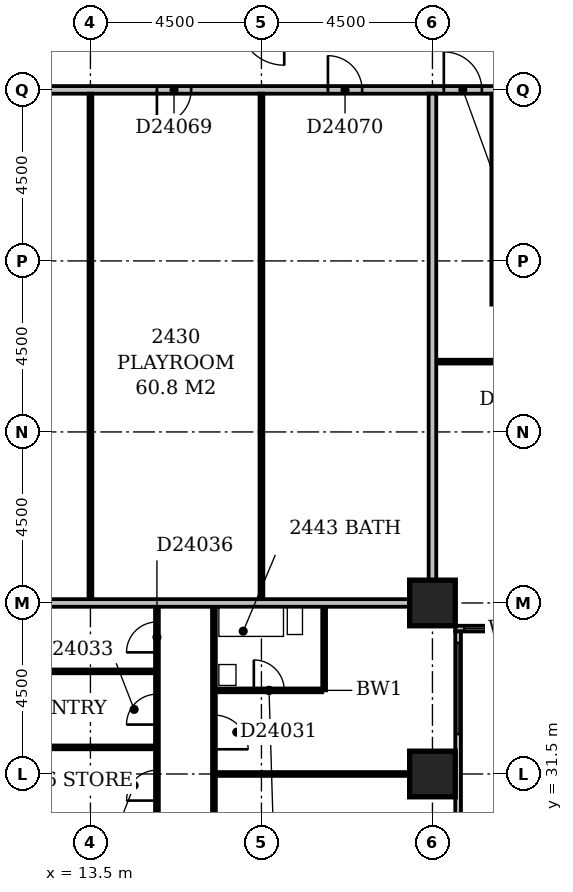
"""IFC4 building model, lengths in metres.
Left out: names, types, materials, properties, quantities, classifications, styles, units other than length and angle.
Written with IfcOpenShell. Run it as: python <this file> out.ifc"""

import sys

from ifc_helpers import new_model, si_unit, direction, frame, frame_2d, origin, origin_2d, place, context, subcontext, project, spatial, rectangle, extrude, element, fill, save


model = new_model("IFC4")
c1 = context("Model", 3, precision=1e-05, world=origin(), true_north=direction((0.0, 1.0)))
c2 = subcontext(c1, "Body", "Model", "MODEL_VIEW")
j1 = project(units=[si_unit("LENGTHUNIT", "METRE"), si_unit("PLANEANGLEUNIT", "RADIAN")], contexts=[c1])
p1 = place(None, origin())
s1 = spatial("IfcSite", under=j1, at=p1, CompositionType="ELEMENT")
p2 = place(p1, origin())
s2 = spatial("IfcBuilding", under=s1, at=p2, CompositionType="ELEMENT")
p3 = place(p2, frame((0.0, 0.0, 97.4)))
s3 = spatial("IfcBuildingStorey", under=s2, at=p3, CompositionType="ELEMENT", Elevation=97.4)
for number, where, z_axis, x_axis in (
    (1, (22.5, 31.5, -0.3), (0.0, 0.0, 1.0), (1.0, 0.0, 0.0)),
    (2, (22.5, 36.0, -0.3), (0.0, 0.0, 1.0), (1.0, 0.0, 0.0)),
):
    element("IfcColumn", number, at=place(p3, frame(where, z_axis=z_axis, x_axis=x_axis)), inside=s3, PredefinedType="COLUMN", context=c2, shape_type="SweptSolid", body=[
        extrude(rectangle(XDim=1.2, YDim=1.2, at=origin_2d()), origin(), (0.0, 0.0, 1.0), 3.6),
    ])
p4 = place(p3, frame((23.175, 17.4, 0.0), z_axis=(0.0, 0.0, 1.0), x_axis=(0.0, 1.0, 0.0)))
e3 = element("IfcWall", 3, at=p4, inside=s3, PredefinedType="STANDARD", context=c2, shape_type="SweptSolid", body=[
    extrude(rectangle(XDim=17.85, YDim=0.15, at=frame_2d((8.925, 0.0))), origin(), (0.0, 0.0, 1.0), 2.7),
])
p5 = place(p4, frame((1.487, 0.0, 0.6)))
e4 = element("IfcOpeningElement", 4, at=p5, cuts=e3, PredefinedType="OPENING", context=c2, shape_type="SweptSolid", body=[
    extrude(rectangle(XDim=1.8, YDim=1.8, at=frame_2d((0.9, 0.9))), frame((0.0, 0.087, 0.0), z_axis=(0.0, -1.0, 0.0), x_axis=(1.0, 0.0, 0.0)), (0.0, 0.0, 1.0), 0.174),
])
p6 = place(p4, frame((6.15, 0.0, 0.6)))
e5 = element("IfcOpeningElement", 5, at=p6, cuts=e3, PredefinedType="OPENING", context=c2, shape_type="SweptSolid", body=[
    extrude(rectangle(XDim=2.4, YDim=1.8, at=frame_2d((1.2, 0.9))), frame((0.0, 0.087, 0.0), z_axis=(0.0, -1.0, 0.0), x_axis=(1.0, 0.0, 0.0)), (0.0, 0.0, 1.0), 0.174),
])
p7 = place(p4, frame((10.65, 0.0, 0.6)))
e6 = element("IfcOpeningElement", 6, at=p7, cuts=e3, PredefinedType="OPENING", context=c2, shape_type="SweptSolid", body=[
    extrude(rectangle(XDim=2.4, YDim=1.8, at=frame_2d((1.2, 0.9))), frame((0.0, 0.087, 0.0), z_axis=(0.0, -1.0, 0.0), x_axis=(1.0, 0.0, 0.0)), (0.0, 0.0, 1.0), 0.174),
])
p8 = place(p4, frame((15.15, 0.0, 0.6)))
e7 = element("IfcOpeningElement", 7, at=p8, cuts=e3, PredefinedType="OPENING", context=c2, shape_type="SweptSolid", body=[
    extrude(rectangle(XDim=2.4, YDim=1.8, at=frame_2d((1.2, 0.9))), frame((0.0, 0.087, 0.0), z_axis=(0.0, -1.0, 0.0), x_axis=(1.0, 0.0, 0.0)), (0.0, 0.0, 1.0), 0.174),
])
p9 = place(p3, frame((23.1, 35.325, 0.0), z_axis=(0.0, 0.0, 1.0), x_axis=(1.0, 0.0, 0.0)))
e8 = element("IfcWall", 8, at=p9, inside=s3, PredefinedType="STANDARD", context=c2, shape_type="SweptSolid", body=[
    extrude(rectangle(XDim=45.15, YDim=0.15, at=frame_2d((22.575, 0.0))), origin(), (0.0, 0.0, 1.0), 2.7),
])
p10 = place(p9, frame((0.238, 0.0, 0.6)))
e9 = element("IfcOpeningElement", 9, at=p10, cuts=e8, PredefinedType="OPENING", context=c2, shape_type="SweptSolid", body=[
    extrude(rectangle(XDim=2.1, YDim=1.8, at=frame_2d((1.05, 0.9))), frame((0.0, 0.087, 0.0), z_axis=(0.0, -1.0, 0.0), x_axis=(1.0, 0.0, 0.0)), (0.0, 0.0, 1.0), 0.174),
])
p11 = place(p9, frame((4.95, 0.0, 0.6)))
e10 = element("IfcOpeningElement", 10, at=p11, cuts=e8, PredefinedType="OPENING", context=c2, shape_type="SweptSolid", body=[
    extrude(rectangle(XDim=2.4, YDim=1.8, at=frame_2d((1.2, 0.9))), frame((0.0, 0.087, 0.0), z_axis=(0.0, -1.0, 0.0), x_axis=(1.0, 0.0, 0.0)), (0.0, 0.0, 1.0), 0.174),
])
p12 = place(p9, frame((9.45, 0.0, 0.6)))
e11 = element("IfcOpeningElement", 11, at=p12, cuts=e8, PredefinedType="OPENING", context=c2, shape_type="SweptSolid", body=[
    extrude(rectangle(XDim=2.4, YDim=1.8, at=frame_2d((1.2, 0.9))), frame((0.0, 0.087, 0.0), z_axis=(0.0, -1.0, 0.0), x_axis=(1.0, 0.0, 0.0)), (0.0, 0.0, 1.0), 0.174),
])
p13 = place(p9, frame((13.95, 0.0, 0.6)))
e12 = element("IfcOpeningElement", 12, at=p13, cuts=e8, PredefinedType="OPENING", context=c2, shape_type="SweptSolid", body=[
    extrude(rectangle(XDim=2.4, YDim=1.8, at=frame_2d((1.2, 0.9))), frame((0.0, 0.087, 0.0), z_axis=(0.0, -1.0, 0.0), x_axis=(1.0, 0.0, 0.0)), (0.0, 0.0, 1.0), 0.174),
])
p14 = place(p9, frame((18.45, 0.0, 0.6)))
e13 = element("IfcOpeningElement", 13, at=p14, cuts=e8, PredefinedType="OPENING", context=c2, shape_type="SweptSolid", body=[
    extrude(rectangle(XDim=2.4, YDim=1.8, at=frame_2d((1.2, 0.9))), frame((0.0, 0.087, 0.0), z_axis=(0.0, -1.0, 0.0), x_axis=(1.0, 0.0, 0.0)), (0.0, 0.0, 1.0), 0.174),
])
p15 = place(p9, frame((24.326, 0.0, 0.6)))
e14 = element("IfcOpeningElement", 14, at=p15, cuts=e8, PredefinedType="OPENING", context=c2, shape_type="SweptSolid", body=[
    extrude(rectangle(XDim=1.2, YDim=1.8, at=frame_2d((0.6, 0.9))), frame((0.0, 0.087, 0.0), z_axis=(0.0, -1.0, 0.0), x_axis=(1.0, 0.0, 0.0)), (0.0, 0.0, 1.0), 0.174),
])
p16 = place(p9, frame((27.227, 0.0, 0.6)))
e15 = element("IfcOpeningElement", 15, at=p16, cuts=e8, PredefinedType="OPENING", context=c2, shape_type="SweptSolid", body=[
    extrude(rectangle(XDim=2.1, YDim=1.8, at=frame_2d((1.05, 0.9))), frame((0.0, 0.087, 0.0), z_axis=(0.0, -1.0, 0.0), x_axis=(1.0, 0.0, 0.0)), (0.0, 0.0, 1.0), 0.174),
])
p17 = place(p9, frame((31.95, 0.0, 0.6)))
e16 = element("IfcOpeningElement", 16, at=p17, cuts=e8, PredefinedType="OPENING", context=c2, shape_type="SweptSolid", body=[
    extrude(rectangle(XDim=2.4, YDim=1.8, at=frame_2d((1.2, 0.9))), frame((0.0, 0.087, 0.0), z_axis=(0.0, -1.0, 0.0), x_axis=(1.0, 0.0, 0.0)), (0.0, 0.0, 1.0), 0.174),
])
p18 = place(p9, frame((36.45, 0.0, 0.6)))
e17 = element("IfcOpeningElement", 17, at=p18, cuts=e8, PredefinedType="OPENING", context=c2, shape_type="SweptSolid", body=[
    extrude(rectangle(XDim=2.4, YDim=1.8, at=frame_2d((1.2, 0.9))), frame((0.0, 0.087, 0.0), z_axis=(0.0, -1.0, 0.0), x_axis=(1.0, 0.0, 0.0)), (0.0, 0.0, 1.0), 0.174),
])
p19 = place(p9, frame((40.95, 0.0, 0.6)))
e18 = element("IfcOpeningElement", 18, at=p19, cuts=e8, PredefinedType="OPENING", context=c2, shape_type="SweptSolid", body=[
    extrude(rectangle(XDim=2.4, YDim=1.8, at=frame_2d((1.2, 0.9))), frame((0.0, 0.087, 0.0), z_axis=(0.0, -1.0, 0.0), x_axis=(1.0, 0.0, 0.0)), (0.0, 0.0, 1.0), 0.174),
])
p20 = place(p3, frame((16.75, 18.1, 0.0), z_axis=(0.0, 0.0, 1.0), x_axis=(0.0, 1.0, 0.0)))
e19 = element("IfcWall", 19, at=p20, inside=s3, PredefinedType="PARTITIONING", context=c2, shape_type="SweptSolid", body=[
    extrude(rectangle(XDim=17.8, YDim=0.1, at=frame_2d((8.9, 0.0))), origin(), (0.0, 0.0, 1.0), 3.3),
])
p21 = place(p20, frame((3.9, 0.0, 0.0)))
e20 = element("IfcOpeningElement", 20, at=p21, cuts=e19, PredefinedType="OPENING", context=c2, shape_type="SweptSolid", body=[
    extrude(rectangle(XDim=0.9, YDim=2.1, at=frame_2d((0.45, 1.05))), frame((0.0, 0.062, 0.0), z_axis=(0.0, -1.0, 0.0), x_axis=(1.0, 0.0, 0.0)), (0.0, 0.0, 1.0), 0.124),
])
p22 = place(p20, frame((10.7, 0.0, 0.0)))
e21 = element("IfcOpeningElement", 21, at=p22, cuts=e19, PredefinedType="OPENING", context=c2, shape_type="SweptSolid", body=[
    extrude(rectangle(XDim=0.9, YDim=2.1, at=frame_2d((0.45, 1.05))), frame((0.0, 0.062, 0.0), z_axis=(0.0, -1.0, 0.0), x_axis=(1.0, 0.0, 0.0)), (0.0, 0.0, 1.0), 0.124),
])
p23 = place(p20, frame((14.05, 0.0, 0.0)))
e22 = element("IfcOpeningElement", 22, at=p23, cuts=e19, PredefinedType="OPENING", context=c2, shape_type="SweptSolid", body=[
    extrude(rectangle(XDim=0.9, YDim=2.1, at=frame_2d((0.45, 1.05))), frame((0.0, 0.062, 0.0), z_axis=(0.0, -1.0, 0.0), x_axis=(1.0, 0.0, 0.0)), (0.0, 0.0, 1.0), 0.124),
])
p24 = place(p3, frame((15.25, 24.7, 0.0), z_axis=(0.0, 0.0, 1.0), x_axis=(0.0, 1.0, 0.0)))
e23 = element("IfcWall", 23, at=p24, inside=s3, PredefinedType="PARTITIONING", context=c2, shape_type="SweptSolid", body=[
    extrude(rectangle(XDim=11.2, YDim=0.1, at=frame_2d((5.6, 0.0))), origin(), (0.0, 0.0, 1.0), 3.3),
])
p25 = place(p24, frame((0.8, 0.0, 0.0)))
e24 = element("IfcOpeningElement", 24, at=p25, cuts=e23, PredefinedType="OPENING", context=c2, shape_type="SweptSolid", body=[
    extrude(rectangle(XDim=0.8, YDim=2.1, at=frame_2d((0.4, 1.05))), frame((0.0, 0.062, 0.0), z_axis=(0.0, -1.0, 0.0), x_axis=(1.0, 0.0, 0.0)), (0.0, 0.0, 1.0), 0.124),
])
p26 = place(p24, frame((8.1, 0.0, 0.0)))
e25 = element("IfcOpeningElement", 25, at=p26, cuts=e23, PredefinedType="OPENING", context=c2, shape_type="SweptSolid", body=[
    extrude(rectangle(XDim=0.8, YDim=2.1, at=frame_2d((0.4, 1.05))), frame((0.0, 0.062, 0.0), z_axis=(0.0, -1.0, 0.0), x_axis=(1.0, 0.0, 0.0)), (0.0, 0.0, 1.0), 0.124),
])
p27 = place(p24, frame((4.3, 0.0, 0.0)))
e26 = element("IfcOpeningElement", 26, at=p27, cuts=e23, PredefinedType="OPENING", context=c2, shape_type="SweptSolid", body=[
    extrude(rectangle(XDim=0.8, YDim=2.1, at=frame_2d((0.4, 1.05))), frame((0.0, 0.062, 0.0), z_axis=(0.0, -1.0, 0.0), x_axis=(1.0, 0.0, 0.0)), (0.0, 0.0, 1.0), 0.124),
])
p28 = place(p24, frame((6.1, 0.0, 0.0)))
e27 = element("IfcOpeningElement", 27, at=p28, cuts=e23, PredefinedType="OPENING", context=c2, shape_type="SweptSolid", body=[
    extrude(rectangle(XDim=0.8, YDim=2.1, at=frame_2d((0.4, 1.05))), frame((0.0, 0.062, 0.0), z_axis=(0.0, -1.0, 0.0), x_axis=(1.0, 0.0, 0.0)), (0.0, 0.0, 1.0), 0.124),
])
p29 = place(p24, frame((10.0, 0.0, 0.0)))
e28 = element("IfcOpeningElement", 28, at=p29, cuts=e23, PredefinedType="OPENING", context=c2, shape_type="SweptSolid", body=[
    extrude(rectangle(XDim=0.8, YDim=2.1, at=frame_2d((0.4, 1.05))), frame((0.0, 0.062, 0.0), z_axis=(0.0, -1.0, 0.0), x_axis=(1.0, 0.0, 0.0)), (0.0, 0.0, 1.0), 0.124),
])
p30 = place(p24, frame((2.75, 0.0, 0.0)))
e29 = element("IfcOpeningElement", 29, at=p30, cuts=e23, PredefinedType="OPENING", context=c2, shape_type="SweptSolid", body=[
    extrude(rectangle(XDim=0.8, YDim=2.1, at=frame_2d((0.4, 1.05))), frame((0.0, 0.062, 0.0), z_axis=(0.0, -1.0, 0.0), x_axis=(1.0, 0.0, 0.0)), (0.0, 0.0, 1.0), 0.124),
])
p31 = place(p3, frame((16.8, 31.5, 0.0), z_axis=(0.0, 0.0, 1.0), x_axis=(1.0, 0.0, 0.0)))
e30 = element("IfcWall", 30, at=p31, inside=s3, PredefinedType="PARTITIONING", context=c2, shape_type="SweptSolid", body=[
    extrude(rectangle(XDim=5.1, YDim=0.1, at=frame_2d((2.55, 0.0))), origin(), (0.0, 0.0, 1.0), 3.3),
])
p32 = place(p3, frame((9.1, 32.2, 0.0), z_axis=(0.0, 0.0, 1.0), x_axis=(1.0, 0.0, 0.0)))
e31 = element("IfcWall", 31, at=p32, inside=s3, PredefinedType="PARTITIONING", context=c2, shape_type="SweptSolid", body=[
    extrude(rectangle(XDim=6.1, YDim=0.1, at=frame_2d((3.05, 0.0))), origin(), (0.0, 0.0, 1.0), 3.3),
])
p33 = place(p3, frame((16.8, 33.7, 0.0), z_axis=(0.0, 0.0, 1.0), x_axis=(1.0, 0.0, 0.0)))
e32 = element("IfcWall", 32, at=p33, inside=s3, PredefinedType="PLUMBINGWALL", context=c2, shape_type="SweptSolid", body=[
    extrude(rectangle(XDim=2.8, YDim=0.1, at=frame_2d((1.4, 0.0))), origin(), (0.0, 0.0, 1.0), 3.3),
])
p34 = place(p33, frame((1.0, 0.0, 0.0)))
e33 = element("IfcOpeningElement", 33, at=p34, cuts=e32, PredefinedType="OPENING", context=c2, shape_type="SweptSolid", body=[
    extrude(rectangle(XDim=0.8, YDim=2.1, at=frame_2d((0.4, 1.05))), frame((0.0, 0.062, 0.0), z_axis=(0.0, -1.0, 0.0), x_axis=(1.0, 0.0, 0.0)), (0.0, 0.0, 1.0), 0.124),
])
p35 = place(p3, frame((19.65, 33.7, 0.0), z_axis=(0.0, 0.0, 1.0), x_axis=(0.0, 1.0, 0.0)))
e34 = element("IfcWall", 34, at=p35, inside=s3, PredefinedType="PLUMBINGWALL", context=c2, shape_type="SweptSolid", body=[
    extrude(rectangle(XDim=2.2, YDim=0.1, at=frame_2d((1.1, 0.0))), origin(), (0.0, 0.0, 1.0), 3.3),
])
p36 = place(p3, frame((9.1, 34.2, 0.0), z_axis=(0.0, 0.0, 1.0), x_axis=(1.0, 0.0, 0.0)))
e35 = element("IfcWall", 35, at=p36, inside=s3, PredefinedType="PARTITIONING", context=c2, shape_type="SweptSolid", body=[
    extrude(rectangle(XDim=6.1, YDim=0.1, at=frame_2d((3.05, 0.0))), origin(), (0.0, 0.0, 1.0), 3.3),
])
p37 = place(p3, frame((9.1, 36.0, 0.0), z_axis=(0.0, 0.0, 1.0), x_axis=(1.0, 0.0, 0.0)))
e36 = element("IfcWall", 36, at=p37, inside=s3, PredefinedType="PARTITIONING", context=c2, shape_type="SweptSolid", body=[
    extrude(rectangle(XDim=12.8, YDim=0.2, at=frame_2d((6.4, 0.0))), origin(), (0.0, 0.0, 1.0), 2.4),
])
for number, where, z_axis, x_axis in (
    (37, (13.5, 36.1, 0.0), (0.0, 0.0, 1.0), (0.0, 1.0, 0.0)),
    (38, (18.0, 36.1, 0.0), (0.0, 0.0, 1.0), (0.0, 1.0, 0.0)),
):
    element("IfcWall", number, at=place(p3, frame(where, z_axis=z_axis, x_axis=x_axis)), inside=s3, PredefinedType="PARTITIONING", context=c2, shape_type="SweptSolid", body=[
        extrude(rectangle(XDim=13.3, YDim=0.1, at=frame_2d((6.65, 0.0))), origin(), (0.0, 0.0, 1.0), 3.3),
    ])
p38 = place(p3, frame((22.5, 36.6, 0.0), z_axis=(0.0, 0.0, 1.0), x_axis=(0.0, 1.0, 0.0)))
e39 = element("IfcWall", 39, at=p38, inside=s3, PredefinedType="PARTITIONING", context=c2, shape_type="SweptSolid", body=[
    extrude(rectangle(XDim=12.8, YDim=0.2, at=frame_2d((6.4, 0.0))), origin(), (0.0, 0.0, 1.0), 3.3),
])
p39 = place(p3, frame((22.6, 42.35, 0.0), z_axis=(0.0, 0.0, 1.0), x_axis=(1.0, 0.0, 0.0)))
e40 = element("IfcWall", 40, at=p39, inside=s3, PredefinedType="PARTITIONING", context=c2, shape_type="SweptSolid", body=[
    extrude(rectangle(XDim=17.8, YDim=0.1, at=frame_2d((8.9, 0.0))), origin(), (0.0, 0.0, 1.0), 3.3),
])
p40 = place(p39, frame((1.7, 0.0, 0.0)))
e41 = element("IfcOpeningElement", 41, at=p40, cuts=e40, PredefinedType="OPENING", context=c2, shape_type="SweptSolid", body=[
    extrude(rectangle(XDim=0.9, YDim=2.1, at=frame_2d((0.45, 1.05))), frame((0.0, 0.062, 0.0), z_axis=(0.0, -1.0, 0.0), x_axis=(1.0, 0.0, 0.0)), (0.0, 0.0, 1.0), 0.124),
])
p41 = place(p39, frame((6.2, 0.0, 0.0)))
e42 = element("IfcOpeningElement", 42, at=p41, cuts=e40, PredefinedType="OPENING", context=c2, shape_type="SweptSolid", body=[
    extrude(rectangle(XDim=0.9, YDim=2.1, at=frame_2d((0.45, 1.05))), frame((0.0, 0.062, 0.0), z_axis=(0.0, -1.0, 0.0), x_axis=(1.0, 0.0, 0.0)), (0.0, 0.0, 1.0), 0.124),
])
p42 = place(p39, frame((10.7, 0.0, 0.0)))
e43 = element("IfcOpeningElement", 43, at=p42, cuts=e40, PredefinedType="OPENING", context=c2, shape_type="SweptSolid", body=[
    extrude(rectangle(XDim=0.9, YDim=2.1, at=frame_2d((0.45, 1.05))), frame((0.0, 0.062, 0.0), z_axis=(0.0, -1.0, 0.0), x_axis=(1.0, 0.0, 0.0)), (0.0, 0.0, 1.0), 0.124),
])
p43 = place(p39, frame((15.2, 0.0, 0.0)))
e44 = element("IfcOpeningElement", 44, at=p43, cuts=e40, PredefinedType="OPENING", context=c2, shape_type="SweptSolid", body=[
    extrude(rectangle(XDim=0.9, YDim=2.1, at=frame_2d((0.45, 1.05))), frame((0.0, 0.062, 0.0), z_axis=(0.0, -1.0, 0.0), x_axis=(1.0, 0.0, 0.0)), (0.0, 0.0, 1.0), 0.124),
])
p44 = place(p3, frame((24.1, 43.85, 0.0), z_axis=(0.0, 0.0, 1.0), x_axis=(0.0, 1.0, 0.0)))
e45 = element("IfcWall", 45, at=p44, inside=s3, PredefinedType="PARTITIONING", context=c2, shape_type="SweptSolid", body=[
    extrude(rectangle(XDim=5.55, YDim=0.1, at=frame_2d((2.775, 0.0))), origin(), (0.0, 0.0, 1.0), 3.3),
])
p45 = place(p3, frame((9.1, 49.5, 0.0), z_axis=(0.0, 0.0, 1.0), x_axis=(1.0, 0.0, 0.0)))
e46 = element("IfcWall", 46, at=p45, inside=s3, PredefinedType="PARTITIONING", context=c2, shape_type="SweptSolid", body=[
    extrude(rectangle(XDim=57.8, YDim=0.2, at=frame_2d((28.9, 0.0))), origin(), (0.0, 0.0, 1.0), 3.3),
])
p46 = place(p45, frame((13.7, 0.0, 0.0)))
e47 = element("IfcOpeningElement", 47, at=p46, cuts=e46, PredefinedType="OPENING", context=c2, shape_type="SweptSolid", body=[
    extrude(rectangle(XDim=1.0, YDim=2.1, at=frame_2d((0.5, 1.05))), frame((0.0, 0.112, 0.0), z_axis=(0.0, -1.0, 0.0), x_axis=(1.0, 0.0, 0.0)), (0.0, 0.0, 1.0), 0.224),
])
p47 = place(p45, frame((38.6, 0.0, 0.0)))
e48 = element("IfcOpeningElement", 48, at=p47, cuts=e46, PredefinedType="OPENING", context=c2, shape_type="SweptSolid", body=[
    extrude(rectangle(XDim=1.0, YDim=2.1, at=frame_2d((0.5, 1.05))), frame((0.0, 0.112, 0.0), z_axis=(0.0, -1.0, 0.0), x_axis=(1.0, 0.0, 0.0)), (0.0, 0.0, 1.0), 0.224),
])
p48 = place(p45, frame((52.1, 0.0, 0.0)))
e49 = element("IfcOpeningElement", 49, at=p48, cuts=e46, PredefinedType="OPENING", context=c2, shape_type="SweptSolid", body=[
    extrude(rectangle(XDim=1.0, YDim=2.1, at=frame_2d((0.5, 1.05))), frame((0.0, 0.112, 0.0), z_axis=(0.0, -1.0, 0.0), x_axis=(1.0, 0.0, 0.0)), (0.0, 0.0, 1.0), 0.224),
])
p49 = place(p45, frame((6.15, 0.0, 0.0)))
e50 = element("IfcOpeningElement", 50, at=p49, cuts=e46, PredefinedType="OPENING", context=c2, shape_type="SweptSolid", body=[
    extrude(rectangle(XDim=0.9, YDim=2.1, at=frame_2d((0.45, 1.05))), frame((0.0, 0.112, 0.0), z_axis=(0.0, -1.0, 0.0), x_axis=(1.0, 0.0, 0.0)), (0.0, 0.0, 1.0), 0.224),
])
p50 = place(p45, frame((10.65, 0.0, 0.0)))
e51 = element("IfcOpeningElement", 51, at=p50, cuts=e46, PredefinedType="OPENING", context=c2, shape_type="SweptSolid", body=[
    extrude(rectangle(XDim=0.9, YDim=2.1, at=frame_2d((0.45, 1.05))), frame((0.0, 0.112, 0.0), z_axis=(0.0, -1.0, 0.0), x_axis=(1.0, 0.0, 0.0)), (0.0, 0.0, 1.0), 0.224),
])
p51 = place(p8, origin())
e52 = element("IfcWindow", 52, at=p51, inside=s3, PartitioningType="SINGLE_PANEL", PredefinedType="WINDOW", context=c2, shape_type="SweptSolid", body=[
    extrude(rectangle(XDim=2.4, YDim=1.8, at=frame_2d((1.2, 0.9))), frame((0.0, 0.03, 0.0), z_axis=(0.0, -1.0, 0.0), x_axis=(1.0, 0.0, 0.0)), (0.0, 0.0, 1.0), 0.06),
])
fill(e7, e52)
p52 = place(p10, origin())
e53 = element("IfcWindow", 53, at=p52, inside=s3, PartitioningType="SINGLE_PANEL", PredefinedType="WINDOW", context=c2, shape_type="SweptSolid", body=[
    extrude(rectangle(XDim=2.1, YDim=1.8, at=frame_2d((1.05, 0.9))), frame((0.0, 0.03, 0.0), z_axis=(0.0, -1.0, 0.0), x_axis=(1.0, 0.0, 0.0)), (0.0, 0.0, 1.0), 0.06),
])
fill(e9, e53)
p53 = place(p23, frame((0.9, 0.0, 0.0), z_axis=(0.0, 0.0, 1.0), x_axis=(-1.0, 0.0, 0.0)))
e54 = element("IfcDoor", 54, at=p53, inside=s3, OperationType="SINGLE_SWING_RIGHT", PredefinedType="DOOR", context=c2, shape_type="SweptSolid", body=[
    extrude(rectangle(XDim=0.9, YDim=2.1, at=frame_2d((0.45, 1.05))), frame((0.0, 0.025, 0.0), z_axis=(0.0, -1.0, 0.0), x_axis=(1.0, 0.0, 0.0)), (0.0, 0.0, 1.0), 0.05),
])
fill(e22, e54)
p54 = place(p26, origin())
e55 = element("IfcDoor", 55, at=p54, inside=s3, OperationType="SINGLE_SWING_LEFT", PredefinedType="DOOR", context=c2, shape_type="SweptSolid", body=[
    extrude(rectangle(XDim=0.8, YDim=2.1, at=frame_2d((0.4, 1.05))), frame((0.0, 0.025, 0.0), z_axis=(0.0, -1.0, 0.0), x_axis=(1.0, 0.0, 0.0)), (0.0, 0.0, 1.0), 0.05),
])
fill(e25, e55)
p55 = place(p28, origin())
e56 = element("IfcDoor", 56, at=p55, inside=s3, OperationType="SINGLE_SWING_LEFT", PredefinedType="DOOR", context=c2, shape_type="SweptSolid", body=[
    extrude(rectangle(XDim=0.8, YDim=2.1, at=frame_2d((0.4, 1.05))), frame((0.0, 0.025, 0.0), z_axis=(0.0, -1.0, 0.0), x_axis=(1.0, 0.0, 0.0)), (0.0, 0.0, 1.0), 0.05),
])
fill(e27, e56)
p56 = place(p29, origin())
e57 = element("IfcDoor", 57, at=p56, inside=s3, OperationType="SINGLE_SWING_LEFT", PredefinedType="DOOR", context=c2, shape_type="SweptSolid", body=[
    extrude(rectangle(XDim=0.8, YDim=2.1, at=frame_2d((0.4, 1.05))), frame((0.0, 0.025, 0.0), z_axis=(0.0, -1.0, 0.0), x_axis=(1.0, 0.0, 0.0)), (0.0, 0.0, 1.0), 0.05),
])
fill(e28, e57)
p57 = place(p34, origin())
e58 = element("IfcDoor", 58, at=p57, inside=s3, OperationType="SINGLE_SWING_LEFT", PredefinedType="DOOR", context=c2, shape_type="SweptSolid", body=[
    extrude(rectangle(XDim=0.8, YDim=2.1, at=frame_2d((0.4, 1.05))), frame((0.0, 0.025, 0.0), z_axis=(0.0, -1.0, 0.0), x_axis=(1.0, 0.0, 0.0)), (0.0, 0.0, 1.0), 0.05),
])
fill(e33, e58)
p58 = place(p46, origin())
e59 = element("IfcDoor", 59, at=p58, inside=s3, OperationType="SINGLE_SWING_LEFT", PredefinedType="DOOR", context=c2, shape_type="SweptSolid", body=[
    extrude(rectangle(XDim=1.0, YDim=2.1, at=frame_2d((0.5, 1.05))), frame((0.0, 0.025, 0.0), z_axis=(0.0, -1.0, 0.0), x_axis=(1.0, 0.0, 0.0)), (0.0, 0.0, 1.0), 0.05),
])
fill(e47, e59)
p59 = place(p49, frame((0.9, 0.0, 0.0), z_axis=(0.0, 0.0, 1.0), x_axis=(-1.0, 0.0, 0.0)))
e60 = element("IfcDoor", 60, at=p59, inside=s3, OperationType="SINGLE_SWING_RIGHT", PredefinedType="DOOR", context=c2, shape_type="SweptSolid", body=[
    extrude(rectangle(XDim=0.9, YDim=2.1, at=frame_2d((0.45, 1.05))), frame((0.0, 0.025, 0.0), z_axis=(0.0, -1.0, 0.0), x_axis=(1.0, 0.0, 0.0)), (0.0, 0.0, 1.0), 0.05),
])
fill(e50, e60)
p60 = place(p50, origin())
e61 = element("IfcDoor", 61, at=p60, inside=s3, OperationType="SINGLE_SWING_LEFT", PredefinedType="DOOR", context=c2, shape_type="SweptSolid", body=[
    extrude(rectangle(XDim=0.9, YDim=2.1, at=frame_2d((0.45, 1.05))), frame((0.0, 0.025, 0.0), z_axis=(0.0, -1.0, 0.0), x_axis=(1.0, 0.0, 0.0)), (0.0, 0.0, 1.0), 0.05),
])
fill(e51, e61)
save(model, sys.argv[1])
